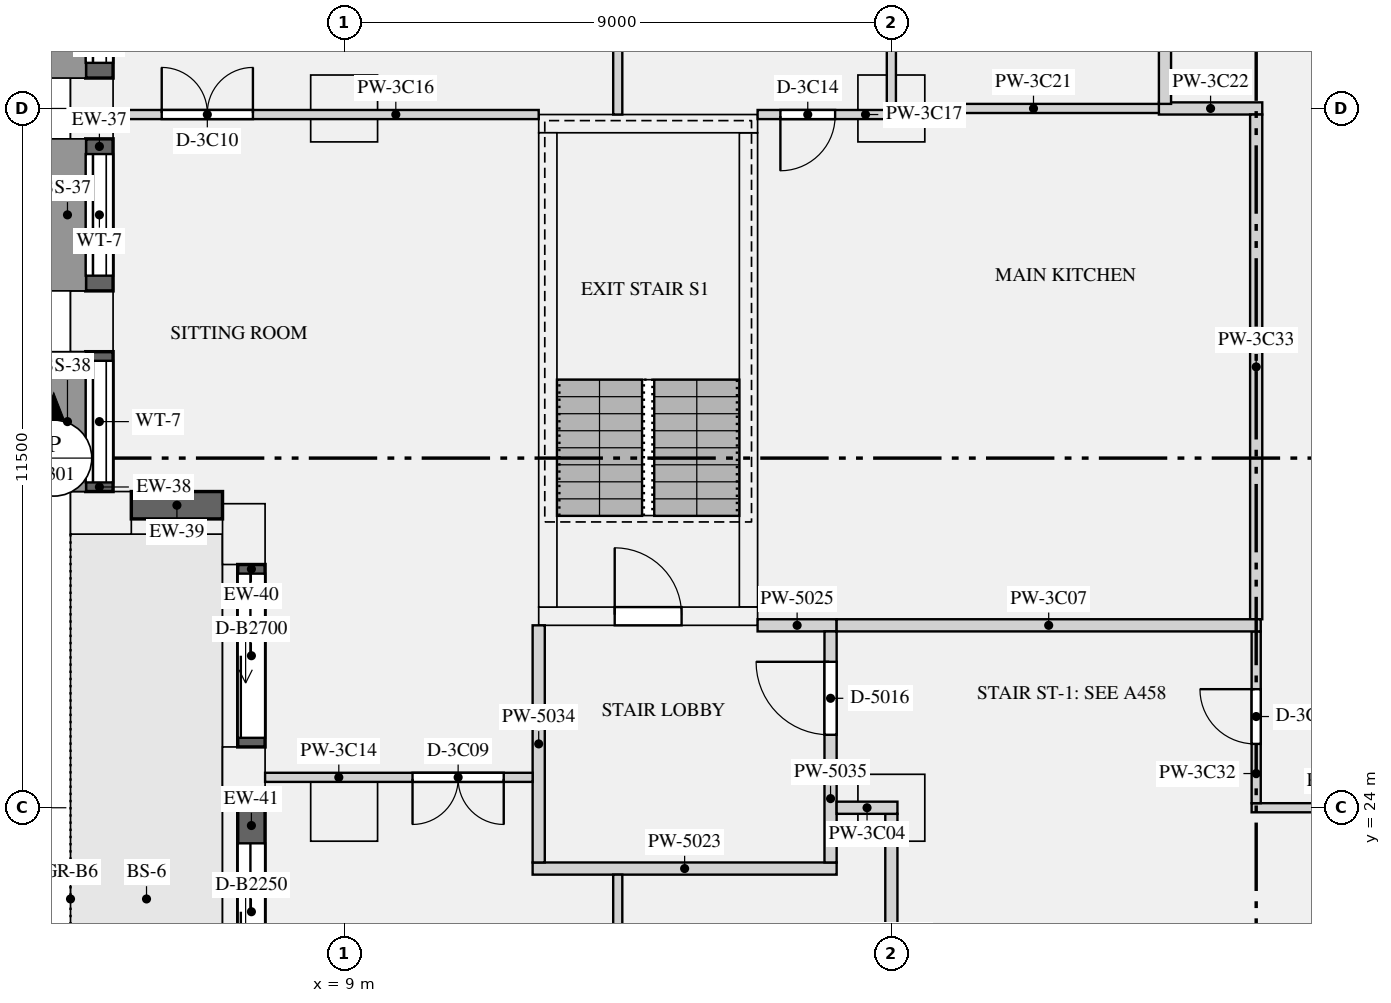
"""IFC4 building model, lengths in metres.
Left out: names, types, materials, properties, quantities, classifications, styles, units other than length and angle.
Written with IfcOpenShell. Run it as: python <this file> out.ifc"""

import sys

from ifc_helpers import new_model, si_unit, direction, frame, frame_2d, origin, origin_2d, place, context, subcontext, project, spatial, rectangle, extrude, element, fill, save


model = new_model("IFC4")
c1 = context("Model", 3, precision=1e-05, world=origin(), true_north=direction((0.0, 1.0)))
c2 = subcontext(c1, "Body", "Model", "MODEL_VIEW")
j1 = project(units=[si_unit("LENGTHUNIT", "METRE"), si_unit("PLANEANGLEUNIT", "RADIAN")], contexts=[c1])
p1 = place(None, origin())
s1 = spatial("IfcSite", under=j1, at=p1, CompositionType="ELEMENT")
p2 = place(p1, origin())
s2 = spatial("IfcBuilding", under=s1, at=p2, CompositionType="ELEMENT")
p3 = place(p2, frame((0.0, 0.0, 160.2)))
s3 = spatial("IfcBuildingStorey", under=s2, at=p3, CompositionType="ELEMENT", Elevation=160.2)
for number, where, z_axis, x_axis in (
    (1, (4.85, 35.5, 0.0), (0.0, 0.0, 1.0), (0.0, -1.0, 0.0)),
    (2, (4.85, 32.0, 0.0), (0.0, 0.0, 1.0), (0.0, -1.0, 0.0)),
    (3, (5.0, 28.85, 0.0), (0.0, 0.0, 1.0), (1.0, 0.0, 0.0)),
    (4, (7.35, 28.5, 0.0), (0.0, 0.0, 1.0), (0.0, -1.0, 0.0)),
    (5, (7.35, 24.5, 0.0), (0.0, 0.0, 1.0), (0.0, -1.0, 0.0)),
):
    element("IfcColumn", number, at=place(p3, frame(where, z_axis=z_axis, x_axis=x_axis)), inside=s3, PredefinedType="USERDEFINED", context=c2, shape_type="SweptSolid", body=[
        extrude(rectangle(XDim=1.0, YDim=0.7, at=origin_2d()), origin(), (0.0, 0.0, 1.0), 3.15),
    ])
for number, where, z_axis, x_axis in (
    (6, (9.0, 24.0, 0.0), (0.0, 0.0, 1.0), (1.0, 0.0, 0.0)),
    (7, (18.0, 24.0, 0.0), (0.0, 0.0, 1.0), (1.0, 0.0, 0.0)),
    (8, (9.0, 35.5, 0.0), (0.0, 0.0, 1.0), (1.0, 0.0, 0.0)),
    (9, (18.0, 35.5, 0.0), (0.0, 0.0, 1.0), (1.0, 0.0, 0.0)),
):
    element("IfcColumn", number, at=place(p3, frame(where, z_axis=z_axis, x_axis=x_axis)), inside=s3, PredefinedType="COLUMN", context=c2, shape_type="SweptSolid", body=[
        extrude(rectangle(XDim=1.1, YDim=1.1, at=origin_2d()), origin(), (0.0, 0.0, 1.0), 3.15),
    ])
p4 = place(p3, frame((12.2, 27.15, 0.0), z_axis=(0.0, 0.0, 1.0), x_axis=(1.0, 0.0, 0.0)))
e10 = element("IfcWall", 10, at=p4, inside=s3, PredefinedType="SHEAR", context=c2, shape_type="SweptSolid", body=[
    extrude(rectangle(XDim=3.6, YDim=0.3, at=frame_2d((1.8, 0.0))), origin(), (0.0, 0.0, 1.0), 3.15),
])
p5 = place(p4, frame((1.25, 0.0, 0.0)))
e11 = element("IfcOpeningElement", 11, at=p5, cuts=e10, PredefinedType="OPENING", context=c2, shape_type="SweptSolid", body=[
    extrude(rectangle(XDim=1.1, YDim=2.1, at=frame_2d((0.55, 1.05))), frame((0.0, 0.16, 0.0), z_axis=(0.0, -1.0, 0.0), x_axis=(1.0, 0.0, 0.0)), (0.0, 0.0, 1.0), 0.32),
])
p6 = place(p3, frame((12.2, 35.25, 0.0), z_axis=(0.0, 0.0, 1.0), x_axis=(1.0, 0.0, 0.0)))
e12 = element("IfcWall", 12, at=p6, inside=s3, PredefinedType="SHEAR", context=c2, shape_type="SweptSolid", body=[
    extrude(rectangle(XDim=3.6, YDim=0.3, at=frame_2d((1.8, 0.0))), origin(), (0.0, 0.0, 1.0), 3.15),
])
for number, where, z_axis, x_axis in (
    (13, (12.35, 27.3, 0.0), (0.0, 0.0, 1.0), (0.0, 1.0, 0.0)),
    (14, (15.65, 27.3, 0.0), (0.0, 0.0, 1.0), (0.0, 1.0, 0.0)),
):
    element("IfcWall", number, at=place(p3, frame(where, z_axis=z_axis, x_axis=x_axis)), inside=s3, PredefinedType="SHEAR", context=c2, shape_type="SweptSolid", body=[
        extrude(rectangle(XDim=7.8, YDim=0.3, at=frame_2d((3.9, 0.0))), origin(), (0.0, 0.0, 1.0), 3.15),
    ])
p7 = place(p3, frame((4.975, 38.0, 0.9), z_axis=(0.0, 0.0, 1.0), x_axis=(0.0, -1.0, 0.0)))
e15 = element("IfcWall", 15, at=p7, inside=s3, PredefinedType="SOLIDWALL", context=c2, shape_type="SweptSolid", body=[
    extrude(rectangle(XDim=2.0, YDim=0.45, at=frame_2d((1.0, 0.0))), origin(), (0.0, 0.0, 1.0), 1.93),
])
p8 = place(p7, frame((0.25, 0.0, 0.15)))
e16 = element("IfcOpeningElement", 16, at=p8, cuts=e15, PredefinedType="OPENING", context=c2, shape_type="SweptSolid", body=[
    extrude(rectangle(XDim=1.5, YDim=1.5, at=frame_2d((0.75, 0.75))), frame((0.0, 0.235, 0.0), z_axis=(0.0, -1.0, 0.0), x_axis=(1.0, 0.0, 0.0)), (0.0, 0.0, 1.0), 0.47),
])
p9 = place(p3, frame((4.975, 35.0, 0.9), z_axis=(0.0, 0.0, 1.0), x_axis=(0.0, -1.0, 0.0)))
e17 = element("IfcWall", 17, at=p9, inside=s3, PredefinedType="SOLIDWALL", context=c2, shape_type="SweptSolid", body=[
    extrude(rectangle(XDim=2.5, YDim=0.45, at=frame_2d((1.25, 0.0))), origin(), (0.0, 0.0, 1.0), 1.93),
])
p10 = place(p9, frame((0.25, 0.0, 0.15)))
e18 = element("IfcOpeningElement", 18, at=p10, cuts=e17, PredefinedType="OPENING", context=c2, shape_type="SweptSolid", body=[
    extrude(rectangle(XDim=2.0, YDim=1.5, at=frame_2d((1.0, 0.75))), frame((0.0, 0.235, 0.0), z_axis=(0.0, -1.0, 0.0), x_axis=(1.0, 0.0, 0.0)), (0.0, 0.0, 1.0), 0.47),
])
p11 = place(p3, frame((4.975, 31.5, 0.9), z_axis=(0.0, 0.0, 1.0), x_axis=(0.0, -1.0, 0.0)))
e19 = element("IfcWall", 19, at=p11, inside=s3, PredefinedType="SOLIDWALL", context=c2, shape_type="SweptSolid", body=[
    extrude(rectangle(XDim=2.3, YDim=0.45, at=frame_2d((1.15, 0.0))), origin(), (0.0, 0.0, 1.0), 1.93),
])
p12 = place(p11, frame((0.15, 0.0, 0.15)))
e20 = element("IfcOpeningElement", 20, at=p12, cuts=e19, PredefinedType="OPENING", context=c2, shape_type="SweptSolid", body=[
    extrude(rectangle(XDim=2.0, YDim=1.5, at=frame_2d((1.0, 0.75))), frame((0.0, 0.235, 0.0), z_axis=(0.0, -1.0, 0.0), x_axis=(1.0, 0.0, 0.0)), (0.0, 0.0, 1.0), 0.47),
])
p13 = place(p3, frame((5.5, 28.975, 0.9), z_axis=(0.0, 0.0, 1.0), x_axis=(1.0, 0.0, 0.0)))
e21 = element("IfcWall", 21, at=p13, inside=s3, PredefinedType="SOLIDWALL", context=c2, shape_type="SweptSolid", body=[
    extrude(rectangle(XDim=1.5, YDim=0.45, at=frame_2d((0.75, 0.0))), origin(), (0.0, 0.0, 1.0), 1.93),
])
p14 = place(p3, frame((7.475, 28.0, 0.0), z_axis=(0.0, 0.0, 1.0), x_axis=(0.0, -1.0, 0.0)))
e22 = element("IfcWall", 22, at=p14, inside=s3, PredefinedType="SOLIDWALL", context=c2, shape_type="SweptSolid", body=[
    extrude(rectangle(XDim=3.0, YDim=0.45, at=frame_2d((1.5, 0.0))), origin(), (0.0, 0.0, 1.0), 2.83),
])
p15 = place(p14, frame((0.15, 0.0, 0.0)))
e23 = element("IfcOpeningElement", 23, at=p15, cuts=e22, PredefinedType="OPENING", context=c2, shape_type="SweptSolid", body=[
    extrude(rectangle(XDim=2.7, YDim=2.3, at=frame_2d((1.35, 1.15))), frame((0.0, 0.235, 0.0), z_axis=(0.0, -1.0, 0.0), x_axis=(1.0, 0.0, 0.0)), (0.0, 0.0, 1.0), 0.47),
])
p16 = place(p3, frame((7.475, 24.0, 0.0), z_axis=(0.0, 0.0, 1.0), x_axis=(0.0, -1.0, 0.0)))
e24 = element("IfcWall", 24, at=p16, inside=s3, PredefinedType="SOLIDWALL", context=c2, shape_type="SweptSolid", body=[
    extrude(rectangle(XDim=3.0, YDim=0.45, at=frame_2d((1.5, 0.0))), origin(), (0.0, 0.0, 1.0), 2.83),
])
p17 = place(p16, frame((0.585, 0.0, 0.0)))
e25 = element("IfcOpeningElement", 25, at=p17, cuts=e24, PredefinedType="OPENING", context=c2, shape_type="SweptSolid", body=[
    extrude(rectangle(XDim=2.25, YDim=2.3, at=frame_2d((1.125, 1.15))), frame((0.0, 0.235, 0.0), z_axis=(0.0, -1.0, 0.0), x_axis=(1.0, 0.0, 0.0)), (0.0, 0.0, 1.0), 0.47),
])
p18 = place(p3, frame((12.1, 23.0, 0.0), z_axis=(0.0, 0.0, 1.0), x_axis=(1.0, 0.0, 0.0)))
e26 = element("IfcWall", 26, at=p18, inside=s3, PredefinedType="PARTITIONING", context=c2, shape_type="SweptSolid", body=[
    extrude(rectangle(XDim=5.0, YDim=0.2, at=frame_2d((2.5, 0.0))), origin(), (0.0, 0.0, 1.0), 2.83),
])
p19 = place(p3, frame((15.8, 27.0, 0.0), z_axis=(0.0, 0.0, 1.0), x_axis=(1.0, 0.0, 0.0)))
e27 = element("IfcWall", 27, at=p19, inside=s3, PredefinedType="PARTITIONING", context=c2, shape_type="SweptSolid", body=[
    extrude(rectangle(XDim=1.3, YDim=0.2, at=frame_2d((0.65, 0.0))), origin(), (0.0, 0.0, 1.0), 2.83),
])
p20 = place(p3, frame((12.2, 23.1, 0.0), z_axis=(0.0, 0.0, 1.0), x_axis=(0.0, 1.0, 0.0)))
e28 = element("IfcWall", 28, at=p20, inside=s3, PredefinedType="PARTITIONING", context=c2, shape_type="SweptSolid", body=[
    extrude(rectangle(XDim=3.9, YDim=0.2, at=frame_2d((1.95, 0.0))), origin(), (0.0, 0.0, 1.0), 2.83),
])
p21 = place(p3, frame((17.0, 23.1, 0.0), z_axis=(0.0, 0.0, 1.0), x_axis=(0.0, 1.0, 0.0)))
e29 = element("IfcWall", 29, at=p21, inside=s3, PredefinedType="PARTITIONING", context=c2, shape_type="SweptSolid", body=[
    extrude(rectangle(XDim=3.8, YDim=0.2, at=frame_2d((1.9, 0.0))), origin(), (0.0, 0.0, 1.0), 2.83),
])
p22 = place(p21, frame((2.1, 0.0, 0.0)))
e30 = element("IfcOpeningElement", 30, at=p22, cuts=e29, PredefinedType="OPENING", context=c2, shape_type="SweptSolid", body=[
    extrude(rectangle(XDim=1.2, YDim=2.1, at=frame_2d((0.6, 1.05))), frame((0.0, 0.11, 0.0), z_axis=(0.0, -1.0, 0.0), x_axis=(1.0, 0.0, 0.0)), (0.0, 0.0, 1.0), 0.22),
])
p23 = place(p3, frame((23.925, 24.0, 0.0), z_axis=(0.0, 0.0, 1.0), x_axis=(1.0, 0.0, 0.0)))
e31 = element("IfcWall", 31, at=p23, inside=s3, PredefinedType="PARTITIONING", context=c2, shape_type="SweptSolid", body=[
    extrude(rectangle(XDim=3.075, YDim=0.15, at=frame_2d((1.538, 0.0))), origin(), (0.0, 0.0, 1.0), 2.83),
])
p24 = place(p3, frame((17.1, 24.0, 0.0), z_axis=(0.0, 0.0, 1.0), x_axis=(1.0, 0.0, 0.0)))
e32 = element("IfcWall", 32, at=p24, inside=s3, PredefinedType="PARTITIONING", context=c2, shape_type="SweptSolid", body=[
    extrude(rectangle(XDim=1.0, YDim=0.2, at=frame_2d((0.5, 0.0))), origin(), (0.0, 0.0, 1.0), 2.83),
])
p25 = place(p3, frame((17.1, 27.0, 0.0), z_axis=(0.0, 0.0, 1.0), x_axis=(1.0, 0.0, 0.0)))
e33 = element("IfcWall", 33, at=p25, inside=s3, PredefinedType="PARTITIONING", context=c2, shape_type="SweptSolid", body=[
    extrude(rectangle(XDim=6.975, YDim=0.2, at=frame_2d((3.487, 0.0))), origin(), (0.0, 0.0, 1.0), 2.83),
])
p26 = place(p3, frame((7.7, 24.5, 0.0), z_axis=(0.0, 0.0, 1.0), x_axis=(1.0, 0.0, 0.0)))
e34 = element("IfcWall", 34, at=p26, inside=s3, PredefinedType="PARTITIONING", context=c2, shape_type="SweptSolid", body=[
    extrude(rectangle(XDim=4.4, YDim=0.15, at=frame_2d((2.2, 0.0))), origin(), (0.0, 0.0, 1.0), 2.83),
])
p27 = place(p26, frame((2.425, 0.0, 0.0)))
e35 = element("IfcOpeningElement", 35, at=p27, cuts=e34, PredefinedType="OPENING", context=c2, shape_type="SweptSolid", body=[
    extrude(rectangle(XDim=1.5, YDim=2.1, at=frame_2d((0.75, 1.05))), frame((0.0, 0.085, 0.0), z_axis=(0.0, -1.0, 0.0), x_axis=(1.0, 0.0, 0.0)), (0.0, 0.0, 1.0), 0.17),
])
p28 = place(p3, frame((5.2, 35.4, 0.0), z_axis=(0.0, 0.0, 1.0), x_axis=(1.0, 0.0, 0.0)))
e36 = element("IfcWall", 36, at=p28, inside=s3, PredefinedType="PARTITIONING", context=c2, shape_type="SweptSolid", body=[
    extrude(rectangle(XDim=7.0, YDim=0.15, at=frame_2d((3.5, 0.0))), origin(), (0.0, 0.0, 1.0), 2.83),
])
p29 = place(p28, frame((0.8, 0.0, 0.0)))
e37 = element("IfcOpeningElement", 37, at=p29, cuts=e36, PredefinedType="OPENING", context=c2, shape_type="SweptSolid", body=[
    extrude(rectangle(XDim=1.5, YDim=2.1, at=frame_2d((0.75, 1.05))), frame((0.0, 0.085, 0.0), z_axis=(0.0, -1.0, 0.0), x_axis=(1.0, 0.0, 0.0)), (0.0, 0.0, 1.0), 0.17),
])
p30 = place(p3, frame((15.8, 35.4, 0.0), z_axis=(0.0, 0.0, 1.0), x_axis=(1.0, 0.0, 0.0)))
e38 = element("IfcWall", 38, at=p30, inside=s3, PredefinedType="PARTITIONING", context=c2, shape_type="SweptSolid", body=[
    extrude(rectangle(XDim=2.275, YDim=0.15, at=frame_2d((1.137, 0.0))), origin(), (0.0, 0.0, 1.0), 2.83),
])
p31 = place(p30, frame((0.375, 0.0, 0.0)))
e39 = element("IfcOpeningElement", 39, at=p31, cuts=e38, PredefinedType="OPENING", context=c2, shape_type="SweptSolid", body=[
    extrude(rectangle(XDim=0.9, YDim=2.1, at=frame_2d((0.45, 1.05))), frame((0.0, 0.085, 0.0), z_axis=(0.0, -1.0, 0.0), x_axis=(1.0, 0.0, 0.0)), (0.0, 0.0, 1.0), 0.17),
])
p32 = place(p3, frame((18.075, 35.5, 0.0), z_axis=(0.0, 0.0, 1.0), x_axis=(1.0, 0.0, 0.0)))
e40 = element("IfcWall", 40, at=p32, inside=s3, PredefinedType="PARTITIONING", context=c2, shape_type="SweptSolid", body=[
    extrude(rectangle(XDim=4.525, YDim=0.15, at=frame_2d((2.263, 0.0))), origin(), (0.0, 0.0, 1.0), 2.83),
])
p33 = place(p3, frame((22.4, 35.5, 0.0), z_axis=(0.0, 0.0, 1.0), x_axis=(1.0, 0.0, 0.0)))
e41 = element("IfcWall", 41, at=p33, inside=s3, PredefinedType="PARTITIONING", context=c2, shape_type="SweptSolid", body=[
    extrude(rectangle(XDim=1.7, YDim=0.2, at=frame_2d((0.85, 0.0))), origin(), (0.0, 0.0, 1.0), 2.83),
])
p34 = place(p3, frame((18.0, 35.475, 0.0), z_axis=(0.0, 0.0, 1.0), x_axis=(0.0, 1.0, 0.0)))
e42 = element("IfcWall", 42, at=p34, inside=s3, PredefinedType="PARTITIONING", context=c2, shape_type="SweptSolid", body=[
    extrude(rectangle(XDim=3.45, YDim=0.15, at=frame_2d((1.725, 0.0))), origin(), (0.0, 0.0, 1.0), 2.83),
])
p35 = place(p3, frame((18.0, 16.1, 0.0), z_axis=(0.0, 0.0, 1.0), x_axis=(0.0, 1.0, 0.0)))
e43 = element("IfcWall", 43, at=p35, inside=s3, PredefinedType="PARTITIONING", context=c2, shape_type="SweptSolid", body=[
    extrude(rectangle(XDim=7.8, YDim=0.2, at=frame_2d((3.9, 0.0))), origin(), (0.0, 0.0, 1.0), 2.83),
])
p36 = place(p35, frame((1.85, 0.0, 0.0)))
e44 = element("IfcOpeningElement", 44, at=p36, cuts=e43, PredefinedType="OPENING", context=c2, shape_type="SweptSolid", body=[
    extrude(rectangle(XDim=1.1, YDim=2.1, at=frame_2d((0.55, 1.05))), frame((0.0, 0.11, 0.0), z_axis=(0.0, -1.0, 0.0), x_axis=(1.0, 0.0, 0.0)), (0.0, 0.0, 1.0), 0.22),
])
p37 = place(p3, frame((24.0, 24.075, 0.0), z_axis=(0.0, 0.0, 1.0), x_axis=(0.0, 1.0, 0.0)))
e45 = element("IfcWall", 45, at=p37, inside=s3, PredefinedType="PARTITIONING", context=c2, shape_type="SweptSolid", body=[
    extrude(rectangle(XDim=2.825, YDim=0.15, at=frame_2d((1.413, 0.0))), origin(), (0.0, 0.0, 1.0), 2.83),
])
p38 = place(p37, frame((0.975, 0.0, 0.0)))
e46 = element("IfcOpeningElement", 46, at=p38, cuts=e45, PredefinedType="OPENING", context=c2, shape_type="SweptSolid", body=[
    extrude(rectangle(XDim=0.9, YDim=2.1, at=frame_2d((0.45, 1.05))), frame((0.0, 0.085, 0.0), z_axis=(0.0, -1.0, 0.0), x_axis=(1.0, 0.0, 0.0)), (0.0, 0.0, 1.0), 0.17),
])
p39 = place(p3, frame((24.0, 27.1, 0.0), z_axis=(0.0, 0.0, 1.0), x_axis=(0.0, 1.0, 0.0)))
e47 = element("IfcWall", 47, at=p39, inside=s3, PredefinedType="PARTITIONING", context=c2, shape_type="SweptSolid", body=[
    extrude(rectangle(XDim=8.3, YDim=0.2, at=frame_2d((4.15, 0.0))), origin(), (0.0, 0.0, 1.0), 2.83),
])
p40 = place(p3, frame((13.5, 12.575, 0.0), z_axis=(0.0, 0.0, 1.0), x_axis=(0.0, 1.0, 0.0)))
e48 = element("IfcWall", 48, at=p40, inside=s3, PredefinedType="PARTITIONING", context=c2, shape_type="SweptSolid", body=[
    extrude(rectangle(XDim=10.325, YDim=0.15, at=frame_2d((5.163, 0.0))), origin(), (0.0, 0.0, 1.0), 2.83),
])
p41 = place(p40, frame((1.475, 0.0, 0.0)))
e49 = element("IfcOpeningElement", 49, at=p41, cuts=e48, PredefinedType="OPENING", context=c2, shape_type="SweptSolid", body=[
    extrude(rectangle(XDim=0.9, YDim=2.1, at=frame_2d((0.45, 1.05))), frame((0.0, 0.085, 0.0), z_axis=(0.0, -1.0, 0.0), x_axis=(1.0, 0.0, 0.0)), (0.0, 0.0, 1.0), 0.17),
])
p42 = place(p40, frame((6.45, 0.0, 0.0)))
e50 = element("IfcOpeningElement", 50, at=p42, cuts=e48, PredefinedType="OPENING", context=c2, shape_type="SweptSolid", body=[
    extrude(rectangle(XDim=1.5, YDim=2.1, at=frame_2d((0.75, 1.05))), frame((0.0, 0.085, 0.0), z_axis=(0.0, -1.0, 0.0), x_axis=(1.0, 0.0, 0.0)), (0.0, 0.0, 1.0), 0.17),
])
p43 = place(p3, frame((13.5, 35.4, 0.0), z_axis=(0.0, 0.0, 1.0), x_axis=(0.0, 1.0, 0.0)))
e51 = element("IfcWall", 51, at=p43, inside=s3, PredefinedType="PARTITIONING", context=c2, shape_type="SweptSolid", body=[
    extrude(rectangle(XDim=7.4, YDim=0.15, at=frame_2d((3.7, 0.0))), origin(), (0.0, 0.0, 1.0), 2.83),
])
p44 = place(p43, frame((1.05, 0.0, 0.0)))
e52 = element("IfcOpeningElement", 52, at=p44, cuts=e51, PredefinedType="OPENING", context=c2, shape_type="SweptSolid", body=[
    extrude(rectangle(XDim=1.5, YDim=2.1, at=frame_2d((0.75, 1.05))), frame((0.0, 0.085, 0.0), z_axis=(0.0, -1.0, 0.0), x_axis=(1.0, 0.0, 0.0)), (0.0, 0.0, 1.0), 0.17),
])
p45 = place(p3, frame((22.5, 35.575, 0.0), z_axis=(0.0, 0.0, 1.0), x_axis=(0.0, 1.0, 0.0)))
e53 = element("IfcWall", 53, at=p45, inside=s3, PredefinedType="PARTITIONING", context=c2, shape_type="SweptSolid", body=[
    extrude(rectangle(XDim=7.225, YDim=0.2, at=frame_2d((3.613, 0.0))), origin(), (0.0, 0.0, 1.0), 2.83),
])
p46 = place(p8, origin())
e54 = element("IfcWindow", 54, at=p46, inside=s3, PartitioningType="SINGLE_PANEL", PredefinedType="WINDOW", context=c2, shape_type="SweptSolid", body=[
    extrude(rectangle(XDim=1.5, YDim=1.5, at=frame_2d((0.75, 0.75))), frame((0.0, -0.065, 0.0), z_axis=(0.0, -1.0, 0.0), x_axis=(1.0, 0.0, 0.0)), (0.0, 0.0, 1.0), 0.06),
])
fill(e16, e54)
p47 = place(p10, origin())
e55 = element("IfcWindow", 55, at=p47, inside=s3, PartitioningType="SINGLE_PANEL", PredefinedType="WINDOW", context=c2, shape_type="SweptSolid", body=[
    extrude(rectangle(XDim=2.0, YDim=1.5, at=frame_2d((1.0, 0.75))), frame((0.0, -0.065, 0.0), z_axis=(0.0, -1.0, 0.0), x_axis=(1.0, 0.0, 0.0)), (0.0, 0.0, 1.0), 0.06),
])
fill(e18, e55)
p48 = place(p12, origin())
e56 = element("IfcWindow", 56, at=p48, inside=s3, PartitioningType="SINGLE_PANEL", PredefinedType="WINDOW", context=c2, shape_type="SweptSolid", body=[
    extrude(rectangle(XDim=2.0, YDim=1.5, at=frame_2d((1.0, 0.75))), frame((0.0, -0.065, 0.0), z_axis=(0.0, -1.0, 0.0), x_axis=(1.0, 0.0, 0.0)), (0.0, 0.0, 1.0), 0.06),
])
fill(e20, e56)
p49 = place(p15, origin())
e57 = element("IfcDoor", 57, at=p49, inside=s3, OperationType="SLIDING_TO_LEFT", PredefinedType="DOOR", context=c2, shape_type="SweptSolid", body=[
    extrude(rectangle(XDim=2.7, YDim=2.3, at=frame_2d((1.35, 1.15))), frame((0.0, -0.07, 0.0), z_axis=(0.0, -1.0, 0.0), x_axis=(1.0, 0.0, 0.0)), (0.0, 0.0, 1.0), 0.05),
])
fill(e23, e57)
p50 = place(p17, origin())
e58 = element("IfcDoor", 58, at=p50, inside=s3, OperationType="SLIDING_TO_LEFT", PredefinedType="DOOR", context=c2, shape_type="SweptSolid", body=[
    extrude(rectangle(XDim=2.25, YDim=2.3, at=frame_2d((1.125, 1.15))), frame((0.0, -0.07, 0.0), z_axis=(0.0, -1.0, 0.0), x_axis=(1.0, 0.0, 0.0)), (0.0, 0.0, 1.0), 0.05),
])
fill(e25, e58)
p51 = place(p5, origin())
e59 = element("IfcDoor", 59, at=p51, inside=s3, OperationType="SINGLE_SWING_LEFT", PredefinedType="DOOR", context=c2, shape_type="SweptSolid", body=[
    extrude(rectangle(XDim=1.1, YDim=2.1, at=frame_2d((0.55, 1.05))), frame((0.0, 0.025, 0.0), z_axis=(0.0, -1.0, 0.0), x_axis=(1.0, 0.0, 0.0)), (0.0, 0.0, 1.0), 0.05),
])
fill(e11, e59)
p52 = place(p22, origin())
e60 = element("IfcDoor", 60, at=p52, inside=s3, OperationType="SINGLE_SWING_RIGHT", PredefinedType="DOOR", context=c2, shape_type="SweptSolid", body=[
    extrude(rectangle(XDim=1.2, YDim=2.1, at=frame_2d((0.6, 1.05))), frame((0.0, 0.025, 0.0), z_axis=(0.0, -1.0, 0.0), x_axis=(1.0, 0.0, 0.0)), (0.0, 0.0, 1.0), 0.05),
])
fill(e30, e60)
p53 = place(p27, frame((1.5, 0.0, 0.0), z_axis=(0.0, 0.0, 1.0), x_axis=(-1.0, 0.0, 0.0)))
e61 = element("IfcDoor", 61, at=p53, inside=s3, OperationType="DOUBLE_DOOR_SINGLE_SWING", PredefinedType="DOOR", context=c2, shape_type="SweptSolid", body=[
    extrude(rectangle(XDim=1.5, YDim=2.1, at=frame_2d((0.75, 1.05))), frame((0.0, 0.025, 0.0), z_axis=(0.0, -1.0, 0.0), x_axis=(1.0, 0.0, 0.0)), (0.0, 0.0, 1.0), 0.05),
])
fill(e35, e61)
p54 = place(p29, origin())
e62 = element("IfcDoor", 62, at=p54, inside=s3, OperationType="DOUBLE_DOOR_SINGLE_SWING", PredefinedType="DOOR", context=c2, shape_type="SweptSolid", body=[
    extrude(rectangle(XDim=1.5, YDim=2.1, at=frame_2d((0.75, 1.05))), frame((0.0, 0.025, 0.0), z_axis=(0.0, -1.0, 0.0), x_axis=(1.0, 0.0, 0.0)), (0.0, 0.0, 1.0), 0.05),
])
fill(e37, e62)
p55 = place(p31, frame((0.9, 0.0, 0.0), z_axis=(0.0, 0.0, 1.0), x_axis=(-1.0, 0.0, 0.0)))
e63 = element("IfcDoor", 63, at=p55, inside=s3, OperationType="SINGLE_SWING_RIGHT", PredefinedType="DOOR", context=c2, shape_type="SweptSolid", body=[
    extrude(rectangle(XDim=0.9, YDim=2.1, at=frame_2d((0.45, 1.05))), frame((0.0, 0.025, 0.0), z_axis=(0.0, -1.0, 0.0), x_axis=(1.0, 0.0, 0.0)), (0.0, 0.0, 1.0), 0.05),
])
fill(e39, e63)
p56 = place(p38, origin())
e64 = element("IfcDoor", 64, at=p56, inside=s3, OperationType="SINGLE_SWING_RIGHT", PredefinedType="DOOR", context=c2, shape_type="SweptSolid", body=[
    extrude(rectangle(XDim=0.9, YDim=2.1, at=frame_2d((0.45, 1.05))), frame((0.0, 0.025, 0.0), z_axis=(0.0, -1.0, 0.0), x_axis=(1.0, 0.0, 0.0)), (0.0, 0.0, 1.0), 0.05),
])
fill(e46, e64)
save(model, sys.argv[1])
